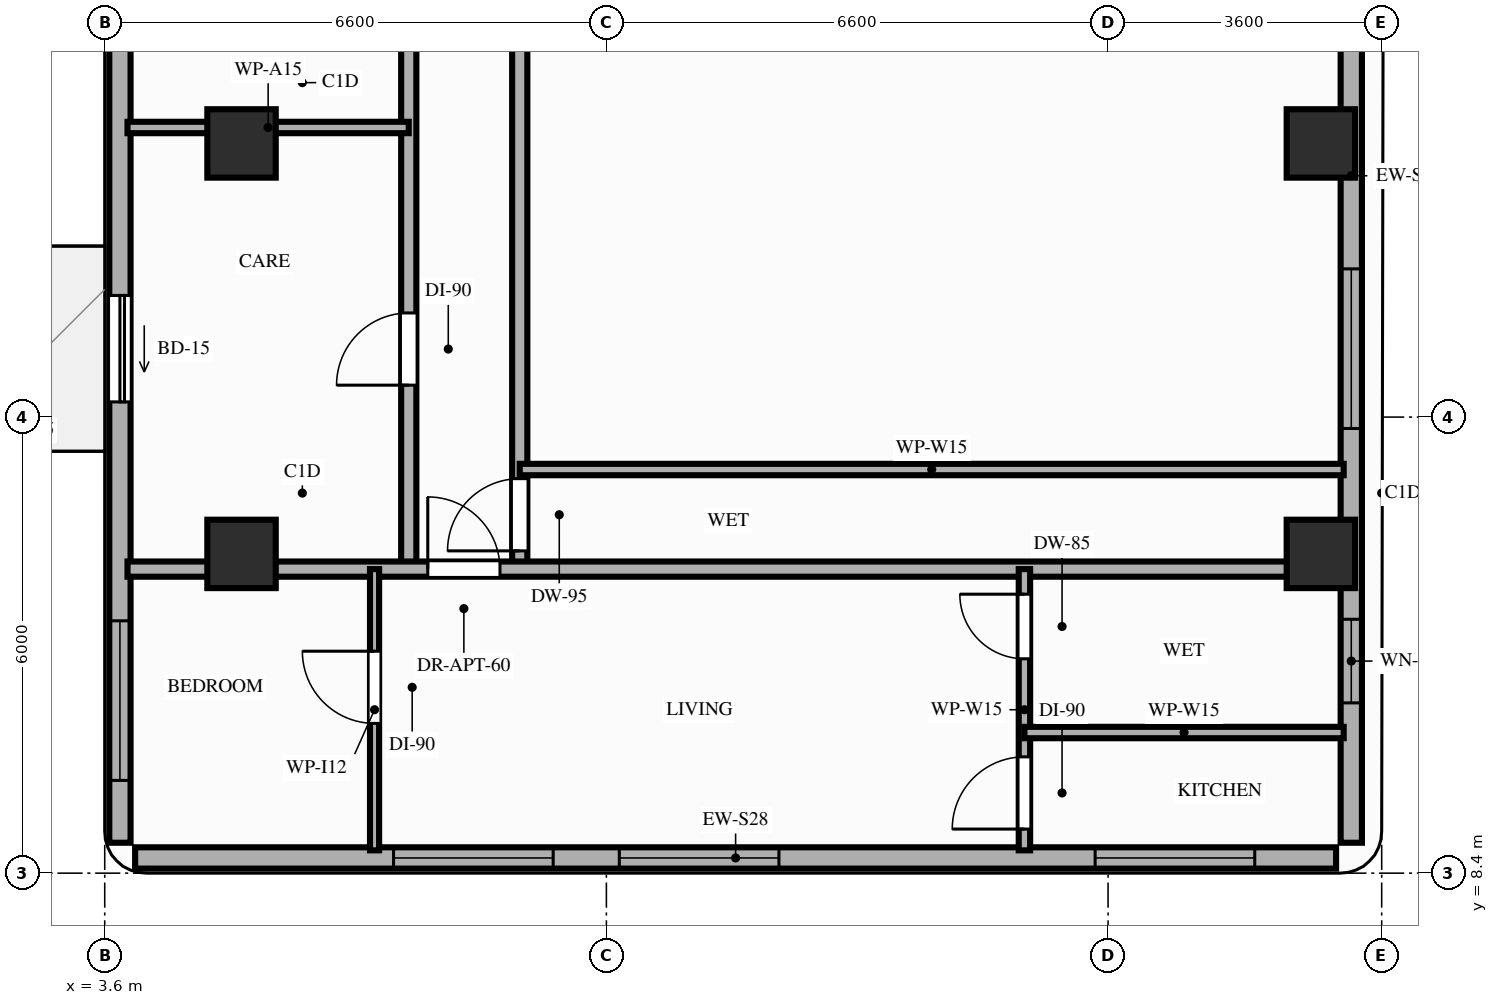
"""IFC4 building model, lengths in metres.
Left out: names, types, materials, properties, quantities, classifications, styles, units other than length and angle.
Written with IfcOpenShell. Run it as: python <this file> out.ifc"""

import sys

from ifc_helpers import new_model, si_unit, direction, frame, frame_2d, origin, origin_2d, place, context, subcontext, project, spatial, rectangle, extrude, element, fill, save


model = new_model("IFC4")
c1 = context("Model", 3, precision=1e-05, world=origin(), true_north=direction((0.0, 1.0)))
c2 = subcontext(c1, "Body", "Model", "MODEL_VIEW")
j1 = project(units=[si_unit("LENGTHUNIT", "METRE"), si_unit("PLANEANGLEUNIT", "RADIAN")], contexts=[c1])
p1 = place(None, origin())
s1 = spatial("IfcSite", under=j1, at=p1, CompositionType="ELEMENT")
p2 = place(p1, origin())
s2 = spatial("IfcBuilding", under=s1, at=p2, CompositionType="ELEMENT")
p3 = place(p2, frame((0.0, 0.0, 192.0)))
s3 = spatial("IfcBuildingStorey", under=s2, at=p3, CompositionType="ELEMENT", Elevation=192.0)
for number, where, z_axis, x_axis in (
    (1, (5.4, 12.6, 0.0), (0.0, 0.0, 1.0), (1.0, 0.0, 0.0)),
    (2, (19.6, 12.6, 0.0), (0.0, 0.0, 1.0), (1.0, 0.0, 0.0)),
    (3, (5.4, 18.0, 0.0), (0.0, 0.0, 1.0), (1.0, 0.0, 0.0)),
    (4, (19.6, 18.0, 0.0), (0.0, 0.0, 1.0), (1.0, 0.0, 0.0)),
):
    element("IfcColumn", number, at=place(p3, frame(where, z_axis=z_axis, x_axis=x_axis)), inside=s3, PredefinedType="COLUMN", context=c2, shape_type="SweptSolid", body=[
        extrude(rectangle(XDim=0.9, YDim=0.9, at=origin_2d()), origin(), (0.0, 0.0, 1.0), 3.2),
    ])
p4 = place(p3, frame((4.0, 8.6, 0.0), z_axis=(0.0, 0.0, 1.0), x_axis=(1.0, 0.0, 0.0)))
e5 = element("IfcWall", 5, at=p4, inside=s3, PredefinedType="STANDARD", context=c2, shape_type="SweptSolid", body=[
    extrude(rectangle(XDim=15.8, YDim=0.28, at=frame_2d((7.9, 0.0))), origin(), (0.0, 0.0, 1.0), 3.02),
])
p5 = place(p4, frame((6.37, 0.0, 0.85)))
e6 = element("IfcOpeningElement", 6, at=p5, cuts=e5, PredefinedType="OPENING", context=c2, shape_type="SweptSolid", body=[
    extrude(rectangle(XDim=2.1, YDim=1.8, at=frame_2d((1.05, 0.9))), frame((0.0, 0.15, 0.0), z_axis=(0.0, -1.0, 0.0), x_axis=(1.0, 0.0, 0.0)), (0.0, 0.0, 1.0), 0.3),
])
p6 = place(p4, frame((12.63, 0.0, 0.85)))
e7 = element("IfcOpeningElement", 7, at=p6, cuts=e5, PredefinedType="OPENING", context=c2, shape_type="SweptSolid", body=[
    extrude(rectangle(XDim=2.1, YDim=1.8, at=frame_2d((1.05, 0.9))), frame((0.0, 0.15, 0.0), z_axis=(0.0, -1.0, 0.0), x_axis=(1.0, 0.0, 0.0)), (0.0, 0.0, 1.0), 0.3),
])
p7 = place(p4, frame((3.4, 0.0, 0.85)))
e8 = element("IfcOpeningElement", 8, at=p7, cuts=e5, PredefinedType="OPENING", context=c2, shape_type="SweptSolid", body=[
    extrude(rectangle(XDim=2.1, YDim=1.8, at=frame_2d((1.05, 0.9))), frame((0.0, 0.15, 0.0), z_axis=(0.0, -1.0, 0.0), x_axis=(1.0, 0.0, 0.0)), (0.0, 0.0, 1.0), 0.3),
])
p8 = place(p3, frame((3.8, 42.1, 0.0), z_axis=(0.0, 0.0, 1.0), x_axis=(0.0, -1.0, 0.0)))
e9 = element("IfcWall", 9, at=p8, inside=s3, PredefinedType="STANDARD", context=c2, shape_type="SweptSolid", body=[
    extrude(rectangle(XDim=33.3, YDim=0.28, at=frame_2d((16.65, 0.0))), origin(), (0.0, 0.0, 1.0), 2.71),
])
p9 = place(p8, frame((26.1, 0.0, 0.0)))
e10 = element("IfcOpeningElement", 10, at=p9, cuts=e9, PredefinedType="OPENING", context=c2, shape_type="SweptSolid", body=[
    extrude(rectangle(XDim=1.4, YDim=2.1, at=frame_2d((0.7, 1.05))), frame((0.0, 0.15, 0.0), z_axis=(0.0, -1.0, 0.0), x_axis=(1.0, 0.0, 0.0)), (0.0, 0.0, 1.0), 0.3),
])
p10 = place(p8, frame((15.3, 0.0, 0.0)))
e11 = element("IfcOpeningElement", 11, at=p10, cuts=e9, PredefinedType="OPENING", context=c2, shape_type="SweptSolid", body=[
    extrude(rectangle(XDim=1.4, YDim=2.1, at=frame_2d((0.7, 1.05))), frame((0.0, 0.15, 0.0), z_axis=(0.0, -1.0, 0.0), x_axis=(1.0, 0.0, 0.0)), (0.0, 0.0, 1.0), 0.3),
])
p11 = place(p8, frame((30.38, 0.0, 0.85)))
e12 = element("IfcOpeningElement", 12, at=p11, cuts=e9, PredefinedType="OPENING", context=c2, shape_type="SweptSolid", body=[
    extrude(rectangle(XDim=2.1, YDim=1.61, at=frame_2d((1.05, 0.805))), frame((0.0, 0.15, 0.0), z_axis=(0.0, -1.0, 0.0), x_axis=(1.0, 0.0, 0.0)), (0.0, 0.0, 1.0), 0.3),
])
p12 = place(p8, frame((20.35, 0.0, 0.85)))
e13 = element("IfcOpeningElement", 13, at=p12, cuts=e9, PredefinedType="OPENING", context=c2, shape_type="SweptSolid", body=[
    extrude(rectangle(XDim=2.1, YDim=1.61, at=frame_2d((1.05, 0.805))), frame((0.0, 0.15, 0.0), z_axis=(0.0, -1.0, 0.0), x_axis=(1.0, 0.0, 0.0)), (0.0, 0.0, 1.0), 0.3),
])
p13 = place(p8, frame((9.75, 0.0, 0.85)))
e14 = element("IfcOpeningElement", 14, at=p13, cuts=e9, PredefinedType="OPENING", context=c2, shape_type="SweptSolid", body=[
    extrude(rectangle(XDim=2.1, YDim=1.61, at=frame_2d((1.05, 0.805))), frame((0.0, 0.15, 0.0), z_axis=(0.0, -1.0, 0.0), x_axis=(1.0, 0.0, 0.0)), (0.0, 0.0, 1.0), 0.3),
])
p14 = place(p8, frame((3.65, 0.0, 0.85)))
e15 = element("IfcOpeningElement", 15, at=p14, cuts=e9, PredefinedType="OPENING", context=c2, shape_type="SweptSolid", body=[
    extrude(rectangle(XDim=2.1, YDim=1.61, at=frame_2d((1.05, 0.805))), frame((0.0, 0.15, 0.0), z_axis=(0.0, -1.0, 0.0), x_axis=(1.0, 0.0, 0.0)), (0.0, 0.0, 1.0), 0.3),
])
p15 = place(p3, frame((20.0, 8.8, 0.0), z_axis=(0.0, 0.0, 1.0), x_axis=(0.0, 1.0, 0.0)))
e16 = element("IfcWall", 16, at=p15, inside=s3, PredefinedType="STANDARD", context=c2, shape_type="SweptSolid", body=[
    extrude(rectangle(XDim=17.55, YDim=0.28, at=frame_2d((8.775, 0.0))), origin(), (0.0, 0.0, 1.0), 2.51),
])
p16 = place(p15, frame((1.84, 0.0, 0.85)))
e17 = element("IfcOpeningElement", 17, at=p16, cuts=e16, PredefinedType="OPENING", context=c2, shape_type="SweptSolid", body=[
    extrude(rectangle(XDim=1.1, YDim=1.41, at=frame_2d((0.55, 0.705))), frame((0.0, 0.15, 0.0), z_axis=(0.0, -1.0, 0.0), x_axis=(1.0, 0.0, 0.0)), (0.0, 0.0, 1.0), 0.3),
])
p17 = place(p15, frame((5.45, 0.0, 0.85)))
e18 = element("IfcOpeningElement", 18, at=p17, cuts=e16, PredefinedType="OPENING", context=c2, shape_type="SweptSolid", body=[
    extrude(rectangle(XDim=2.1, YDim=1.41, at=frame_2d((1.05, 0.705))), frame((0.0, 0.15, 0.0), z_axis=(0.0, -1.0, 0.0), x_axis=(1.0, 0.0, 0.0)), (0.0, 0.0, 1.0), 0.3),
])
p18 = place(p15, frame((10.85, 0.0, 0.85)))
e19 = element("IfcOpeningElement", 19, at=p18, cuts=e16, PredefinedType="OPENING", context=c2, shape_type="SweptSolid", body=[
    extrude(rectangle(XDim=2.1, YDim=1.41, at=frame_2d((1.05, 0.705))), frame((0.0, 0.15, 0.0), z_axis=(0.0, -1.0, 0.0), x_axis=(1.0, 0.0, 0.0)), (0.0, 0.0, 1.0), 0.3),
])
p19 = place(p3, frame((7.6, 12.4, 0.0), z_axis=(0.0, 0.0, 1.0), x_axis=(0.0, 1.0, 0.0)))
e20 = element("IfcWall", 20, at=p19, inside=s3, PredefinedType="PARTITIONING", context=c2, shape_type="SweptSolid", body=[
    extrude(rectangle(XDim=15.7, YDim=0.2, at=frame_2d((7.85, 0.0))), origin(), (0.0, 0.0, 1.0), 2.51),
])
p20 = place(p19, frame((2.42, 0.0, 0.0)))
e21 = element("IfcOpeningElement", 21, at=p20, cuts=e20, PredefinedType="OPENING", context=c2, shape_type="SweptSolid", body=[
    extrude(rectangle(XDim=0.95, YDim=2.15, at=frame_2d((0.475, 1.075))), frame((0.0, 0.11, 0.0), z_axis=(0.0, -1.0, 0.0), x_axis=(1.0, 0.0, 0.0)), (0.0, 0.0, 1.0), 0.22),
])
p21 = place(p19, frame((10.28, 0.0, 0.0)))
e22 = element("IfcOpeningElement", 22, at=p21, cuts=e20, PredefinedType="OPENING", context=c2, shape_type="SweptSolid", body=[
    extrude(rectangle(XDim=0.95, YDim=2.15, at=frame_2d((0.475, 1.075))), frame((0.0, 0.11, 0.0), z_axis=(0.0, -1.0, 0.0), x_axis=(1.0, 0.0, 0.0)), (0.0, 0.0, 1.0), 0.22),
])
p22 = place(p3, frame((9.06, 12.4, 0.0), z_axis=(0.0, 0.0, 1.0), x_axis=(0.0, 1.0, 0.0)))
e23 = element("IfcWall", 23, at=p22, inside=s3, PredefinedType="PARTITIONING", context=c2, shape_type="SweptSolid", body=[
    extrude(rectangle(XDim=15.7, YDim=0.2, at=frame_2d((7.85, 0.0))), origin(), (0.0, 0.0, 1.0), 2.51),
])
p23 = place(p22, frame((0.24, 0.0, 0.0)))
e24 = element("IfcOpeningElement", 24, at=p23, cuts=e23, PredefinedType="OPENING", context=c2, shape_type="SweptSolid", body=[
    extrude(rectangle(XDim=0.95, YDim=2.1, at=frame_2d((0.475, 1.05))), frame((0.0, 0.11, 0.0), z_axis=(0.0, -1.0, 0.0), x_axis=(1.0, 0.0, 0.0)), (0.0, 0.0, 1.0), 0.22),
])
p24 = place(p22, frame((8.03, 0.0, 0.0)))
e25 = element("IfcOpeningElement", 25, at=p24, cuts=e23, PredefinedType="OPENING", context=c2, shape_type="SweptSolid", body=[
    extrude(rectangle(XDim=0.95, YDim=2.15, at=frame_2d((0.475, 1.075))), frame((0.0, 0.11, 0.0), z_axis=(0.0, -1.0, 0.0), x_axis=(1.0, 0.0, 0.0)), (0.0, 0.0, 1.0), 0.22),
])
p25 = place(p3, frame((3.9, 12.4, 0.0), z_axis=(0.0, 0.0, 1.0), x_axis=(1.0, 0.0, 0.0)))
e26 = element("IfcWall", 26, at=p25, inside=s3, PredefinedType="PARTITIONING", context=c2, shape_type="SweptSolid", body=[
    extrude(rectangle(XDim=16.0, YDim=0.2, at=frame_2d((8.0, 0.0))), origin(), (0.0, 0.0, 1.0), 2.51),
])
p26 = place(p25, frame((3.95, 0.0, 0.0)))
e27 = element("IfcOpeningElement", 27, at=p26, cuts=e26, PredefinedType="OPENING", context=c2, shape_type="SweptSolid", body=[
    extrude(rectangle(XDim=0.95, YDim=2.15, at=frame_2d((0.475, 1.075))), frame((0.0, 0.11, 0.0), z_axis=(0.0, -1.0, 0.0), x_axis=(1.0, 0.0, 0.0)), (0.0, 0.0, 1.0), 0.22),
])
p27 = place(p3, frame((7.15, 8.7, 0.0), z_axis=(0.0, 0.0, 1.0), x_axis=(0.0, 1.0, 0.0)))
e28 = element("IfcWall", 28, at=p27, inside=s3, PredefinedType="PARTITIONING", context=c2, shape_type="SweptSolid", body=[
    extrude(rectangle(XDim=3.7, YDim=0.12, at=frame_2d((1.85, 0.0))), origin(), (0.0, 0.0, 1.0), 2.51),
])
p28 = place(p27, frame((1.67, 0.0, 0.0)))
e29 = element("IfcOpeningElement", 29, at=p28, cuts=e28, PredefinedType="OPENING", context=c2, shape_type="SweptSolid", body=[
    extrude(rectangle(XDim=0.95, YDim=2.15, at=frame_2d((0.475, 1.075))), frame((0.0, 0.07, 0.0), z_axis=(0.0, -1.0, 0.0), x_axis=(1.0, 0.0, 0.0)), (0.0, 0.0, 1.0), 0.14),
])
p29 = place(p3, frame((15.7, 8.7, 0.0), z_axis=(0.0, 0.0, 1.0), x_axis=(0.0, 1.0, 0.0)))
e30 = element("IfcWall", 30, at=p29, inside=s3, PredefinedType="PARTITIONING", context=c2, shape_type="SweptSolid", body=[
    extrude(rectangle(XDim=3.7, YDim=0.15, at=frame_2d((1.85, 0.0))), origin(), (0.0, 0.0, 1.0), 2.51),
])
p30 = place(p29, frame((0.28, 0.0, 0.0)))
e31 = element("IfcOpeningElement", 31, at=p30, cuts=e30, PredefinedType="OPENING", context=c2, shape_type="SweptSolid", body=[
    extrude(rectangle(XDim=0.95, YDim=2.15, at=frame_2d((0.475, 1.075))), frame((0.0, 0.085, 0.0), z_axis=(0.0, -1.0, 0.0), x_axis=(1.0, 0.0, 0.0)), (0.0, 0.0, 1.0), 0.17),
])
p31 = place(p29, frame((2.52, 0.0, 0.0)))
e32 = element("IfcOpeningElement", 32, at=p31, cuts=e30, PredefinedType="OPENING", context=c2, shape_type="SweptSolid", body=[
    extrude(rectangle(XDim=0.85, YDim=2.1, at=frame_2d((0.425, 1.05))), frame((0.0, 0.085, 0.0), z_axis=(0.0, -1.0, 0.0), x_axis=(1.0, 0.0, 0.0)), (0.0, 0.0, 1.0), 0.17),
])
p32 = place(p3, frame((15.7, 10.25, 0.0), z_axis=(0.0, 0.0, 1.0), x_axis=(1.0, 0.0, 0.0)))
e33 = element("IfcWall", 33, at=p32, inside=s3, PredefinedType="PARTITIONING", context=c2, shape_type="SweptSolid", body=[
    extrude(rectangle(XDim=4.2, YDim=0.15, at=frame_2d((2.1, 0.0))), origin(), (0.0, 0.0, 1.0), 3.02),
])
p33 = place(p3, frame((3.9, 18.21, 0.0), z_axis=(0.0, 0.0, 1.0), x_axis=(1.0, 0.0, 0.0)))
e34 = element("IfcWall", 34, at=p33, inside=s3, PredefinedType="PARTITIONING", context=c2, shape_type="SweptSolid", body=[
    extrude(rectangle(XDim=3.7, YDim=0.15, at=frame_2d((1.85, 0.0))), origin(), (0.0, 0.0, 1.0), 2.51),
])
p34 = place(p3, frame((9.06, 13.71, 0.0), z_axis=(0.0, 0.0, 1.0), x_axis=(1.0, 0.0, 0.0)))
e35 = element("IfcWall", 35, at=p34, inside=s3, PredefinedType="PARTITIONING", context=c2, shape_type="SweptSolid", body=[
    extrude(rectangle(XDim=10.84, YDim=0.15, at=frame_2d((5.42, 0.0))), origin(), (0.0, 0.0, 1.0), 2.51),
])
p35 = place(p9, origin())
e36 = element("IfcDoor", 36, at=p35, inside=s3, OperationType="SLIDING_TO_RIGHT", PredefinedType="DOOR", context=c2, shape_type="SweptSolid", body=[
    extrude(rectangle(XDim=1.4, YDim=2.1, at=frame_2d((0.7, 1.05))), frame((0.0, 0.025, 0.0), z_axis=(0.0, -1.0, 0.0), x_axis=(1.0, 0.0, 0.0)), (0.0, 0.0, 1.0), 0.05),
])
fill(e10, e36)
p36 = place(p11, origin())
e37 = element("IfcWindow", 37, at=p36, inside=s3, PartitioningType="SINGLE_PANEL", PredefinedType="WINDOW", context=c2, shape_type="SweptSolid", body=[
    extrude(rectangle(XDim=2.1, YDim=1.61, at=frame_2d((1.05, 0.805))), frame((0.0, 0.03, 0.0), z_axis=(0.0, -1.0, 0.0), x_axis=(1.0, 0.0, 0.0)), (0.0, 0.0, 1.0), 0.06),
])
fill(e12, e37)
p37 = place(p5, origin())
e38 = element("IfcWindow", 38, at=p37, inside=s3, PartitioningType="SINGLE_PANEL", PredefinedType="WINDOW", context=c2, shape_type="SweptSolid", body=[
    extrude(rectangle(XDim=2.1, YDim=1.8, at=frame_2d((1.05, 0.9))), frame((0.0, 0.03, 0.0), z_axis=(0.0, -1.0, 0.0), x_axis=(1.0, 0.0, 0.0)), (0.0, 0.0, 1.0), 0.06),
])
fill(e6, e38)
p38 = place(p6, origin())
e39 = element("IfcWindow", 39, at=p38, inside=s3, PartitioningType="SINGLE_PANEL", PredefinedType="WINDOW", context=c2, shape_type="SweptSolid", body=[
    extrude(rectangle(XDim=2.1, YDim=1.8, at=frame_2d((1.05, 0.9))), frame((0.0, 0.03, 0.0), z_axis=(0.0, -1.0, 0.0), x_axis=(1.0, 0.0, 0.0)), (0.0, 0.0, 1.0), 0.06),
])
fill(e7, e39)
p39 = place(p16, origin())
e40 = element("IfcWindow", 40, at=p39, inside=s3, PartitioningType="SINGLE_PANEL", PredefinedType="WINDOW", context=c2, shape_type="SweptSolid", body=[
    extrude(rectangle(XDim=1.1, YDim=1.41, at=frame_2d((0.55, 0.705))), frame((0.0, 0.03, 0.0), z_axis=(0.0, -1.0, 0.0), x_axis=(1.0, 0.0, 0.0)), (0.0, 0.0, 1.0), 0.06),
])
fill(e17, e40)
p40 = place(p17, origin())
e41 = element("IfcWindow", 41, at=p40, inside=s3, PartitioningType="SINGLE_PANEL", PredefinedType="WINDOW", context=c2, shape_type="SweptSolid", body=[
    extrude(rectangle(XDim=2.1, YDim=1.41, at=frame_2d((1.05, 0.705))), frame((0.0, 0.03, 0.0), z_axis=(0.0, -1.0, 0.0), x_axis=(1.0, 0.0, 0.0)), (0.0, 0.0, 1.0), 0.06),
])
fill(e18, e41)
p41 = place(p7, origin())
e42 = element("IfcWindow", 42, at=p41, inside=s3, PartitioningType="SINGLE_PANEL", PredefinedType="WINDOW", context=c2, shape_type="SweptSolid", body=[
    extrude(rectangle(XDim=2.1, YDim=1.8, at=frame_2d((1.05, 0.9))), frame((0.0, 0.03, 0.0), z_axis=(0.0, -1.0, 0.0), x_axis=(1.0, 0.0, 0.0)), (0.0, 0.0, 1.0), 0.06),
])
fill(e8, e42)
p42 = place(p26, origin())
e43 = element("IfcDoor", 43, at=p42, inside=s3, OperationType="SINGLE_SWING_LEFT", PredefinedType="DOOR", context=c2, shape_type="SweptSolid", body=[
    extrude(rectangle(XDim=0.95, YDim=2.15, at=frame_2d((0.475, 1.075))), frame((0.0, 0.025, 0.0), z_axis=(0.0, -1.0, 0.0), x_axis=(1.0, 0.0, 0.0)), (0.0, 0.0, 1.0), 0.05),
])
fill(e27, e43)
p43 = place(p28, origin())
e44 = element("IfcDoor", 44, at=p43, inside=s3, OperationType="SINGLE_SWING_RIGHT", PredefinedType="DOOR", context=c2, shape_type="SweptSolid", body=[
    extrude(rectangle(XDim=0.95, YDim=2.15, at=frame_2d((0.475, 1.075))), frame((0.0, 0.025, 0.0), z_axis=(0.0, -1.0, 0.0), x_axis=(1.0, 0.0, 0.0)), (0.0, 0.0, 1.0), 0.05),
])
fill(e29, e44)
p44 = place(p30, origin())
e45 = element("IfcDoor", 45, at=p44, inside=s3, OperationType="SINGLE_SWING_LEFT", PredefinedType="DOOR", context=c2, shape_type="SweptSolid", body=[
    extrude(rectangle(XDim=0.95, YDim=2.15, at=frame_2d((0.475, 1.075))), frame((0.0, 0.025, 0.0), z_axis=(0.0, -1.0, 0.0), x_axis=(1.0, 0.0, 0.0)), (0.0, 0.0, 1.0), 0.05),
])
fill(e31, e45)
p45 = place(p31, origin())
e46 = element("IfcDoor", 46, at=p45, inside=s3, OperationType="SINGLE_SWING_RIGHT", PredefinedType="DOOR", context=c2, shape_type="SweptSolid", body=[
    extrude(rectangle(XDim=0.85, YDim=2.1, at=frame_2d((0.425, 1.05))), frame((0.0, 0.025, 0.0), z_axis=(0.0, -1.0, 0.0), x_axis=(1.0, 0.0, 0.0)), (0.0, 0.0, 1.0), 0.05),
])
fill(e32, e46)
p46 = place(p20, origin())
e47 = element("IfcDoor", 47, at=p46, inside=s3, OperationType="SINGLE_SWING_LEFT", PredefinedType="DOOR", context=c2, shape_type="SweptSolid", body=[
    extrude(rectangle(XDim=0.95, YDim=2.15, at=frame_2d((0.475, 1.075))), frame((0.0, 0.025, 0.0), z_axis=(0.0, -1.0, 0.0), x_axis=(1.0, 0.0, 0.0)), (0.0, 0.0, 1.0), 0.05),
])
fill(e21, e47)
p47 = place(p23, origin())
e48 = element("IfcDoor", 48, at=p47, inside=s3, OperationType="SINGLE_SWING_LEFT", PredefinedType="DOOR", context=c2, shape_type="SweptSolid", body=[
    extrude(rectangle(XDim=0.95, YDim=2.1, at=frame_2d((0.475, 1.05))), frame((0.0, 0.025, 0.0), z_axis=(0.0, -1.0, 0.0), x_axis=(1.0, 0.0, 0.0)), (0.0, 0.0, 1.0), 0.05),
])
fill(e24, e48)
save(model, sys.argv[1])
